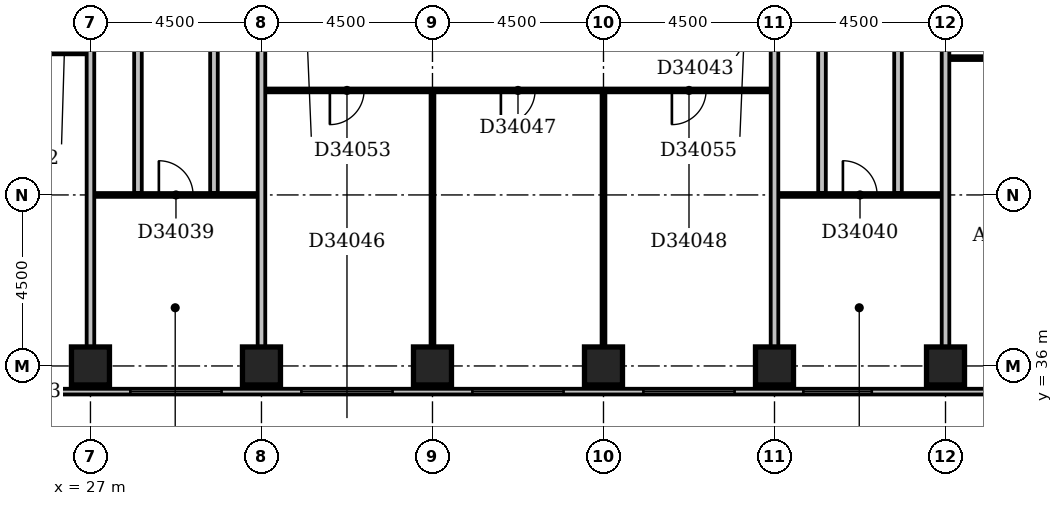
"""IFC4 building model, lengths in metres.
Left out: names, types, materials, properties, quantities, classifications, styles, units other than length and angle.
Written with IfcOpenShell. Run it as: python <this file> out.ifc"""

import sys

from ifc_helpers import new_model, si_unit, direction, frame, frame_2d, origin, origin_2d, place, context, subcontext, project, spatial, rectangle, extrude, element, fill, save


model = new_model("IFC4")
c1 = context("Model", 3, precision=1e-05, world=origin(), true_north=direction((0.0, 1.0)))
c2 = subcontext(c1, "Body", "Model", "MODEL_VIEW")
j1 = project(units=[si_unit("LENGTHUNIT", "METRE"), si_unit("PLANEANGLEUNIT", "RADIAN")], contexts=[c1])
p1 = place(None, origin())
s1 = spatial("IfcSite", under=j1, at=p1, CompositionType="ELEMENT")
p2 = place(p1, origin())
s2 = spatial("IfcBuilding", under=s1, at=p2, CompositionType="ELEMENT")
p3 = place(p2, frame((0.0, 0.0, 137.6)))
s3 = spatial("IfcBuildingStorey", under=s2, at=p3, CompositionType="ELEMENT", Elevation=137.6)
for number, where, z_axis, x_axis in (
    (1, (27.0, 36.0, -0.3), (0.0, 0.0, 1.0), (1.0, 0.0, 0.0)),
    (2, (31.5, 36.0, -0.3), (0.0, 0.0, 1.0), (1.0, 0.0, 0.0)),
    (3, (36.0, 36.0, -0.3), (0.0, 0.0, 1.0), (1.0, 0.0, 0.0)),
    (4, (40.5, 36.0, -0.3), (0.0, 0.0, 1.0), (1.0, 0.0, 0.0)),
    (5, (45.0, 36.0, -0.3), (0.0, 0.0, 1.0), (1.0, 0.0, 0.0)),
    (6, (49.5, 36.0, -0.3), (0.0, 0.0, 1.0), (1.0, 0.0, 0.0)),
):
    element("IfcColumn", number, at=place(p3, frame(where, z_axis=z_axis, x_axis=x_axis)), inside=s3, PredefinedType="COLUMN", context=c2, shape_type="SweptSolid", body=[
        extrude(rectangle(XDim=1.0, YDim=1.0, at=origin_2d()), origin(), (0.0, 0.0, 1.0), 3.6),
    ])
p4 = place(p3, frame((23.1, 35.325, 0.0), z_axis=(0.0, 0.0, 1.0), x_axis=(1.0, 0.0, 0.0)))
e7 = element("IfcWall", 7, at=p4, inside=s3, PredefinedType="STANDARD", context=c2, shape_type="SweptSolid", body=[
    extrude(rectangle(XDim=45.15, YDim=0.15, at=frame_2d((22.575, 0.0))), origin(), (0.0, 0.0, 1.0), 2.7),
])
p5 = place(p4, frame((2.235, 0.0, 0.6)))
e8 = element("IfcOpeningElement", 8, at=p5, cuts=e7, PredefinedType="OPENING", context=c2, shape_type="SweptSolid", body=[
    extrude(rectangle(XDim=0.9, YDim=1.8, at=frame_2d((0.45, 0.9))), frame((0.0, 0.087, 0.0), z_axis=(0.0, -1.0, 0.0), x_axis=(1.0, 0.0, 0.0)), (0.0, 0.0, 1.0), 0.174),
])
p6 = place(p4, frame((4.95, 0.0, 0.6)))
e9 = element("IfcOpeningElement", 9, at=p6, cuts=e7, PredefinedType="OPENING", context=c2, shape_type="SweptSolid", body=[
    extrude(rectangle(XDim=2.4, YDim=1.8, at=frame_2d((1.2, 0.9))), frame((0.0, 0.087, 0.0), z_axis=(0.0, -1.0, 0.0), x_axis=(1.0, 0.0, 0.0)), (0.0, 0.0, 1.0), 0.174),
])
p7 = place(p4, frame((9.45, 0.0, 0.6)))
e10 = element("IfcOpeningElement", 10, at=p7, cuts=e7, PredefinedType="OPENING", context=c2, shape_type="SweptSolid", body=[
    extrude(rectangle(XDim=2.4, YDim=1.8, at=frame_2d((1.2, 0.9))), frame((0.0, 0.087, 0.0), z_axis=(0.0, -1.0, 0.0), x_axis=(1.0, 0.0, 0.0)), (0.0, 0.0, 1.0), 0.174),
])
p8 = place(p4, frame((13.95, 0.0, 0.6)))
e11 = element("IfcOpeningElement", 11, at=p8, cuts=e7, PredefinedType="OPENING", context=c2, shape_type="SweptSolid", body=[
    extrude(rectangle(XDim=2.4, YDim=1.8, at=frame_2d((1.2, 0.9))), frame((0.0, 0.087, 0.0), z_axis=(0.0, -1.0, 0.0), x_axis=(1.0, 0.0, 0.0)), (0.0, 0.0, 1.0), 0.174),
])
p9 = place(p4, frame((18.45, 0.0, 0.6)))
e12 = element("IfcOpeningElement", 12, at=p9, cuts=e7, PredefinedType="OPENING", context=c2, shape_type="SweptSolid", body=[
    extrude(rectangle(XDim=2.4, YDim=1.8, at=frame_2d((1.2, 0.9))), frame((0.0, 0.087, 0.0), z_axis=(0.0, -1.0, 0.0), x_axis=(1.0, 0.0, 0.0)), (0.0, 0.0, 1.0), 0.174),
])
p10 = place(p4, frame((22.66, 0.0, 0.6)))
e13 = element("IfcOpeningElement", 13, at=p10, cuts=e7, PredefinedType="OPENING", context=c2, shape_type="SweptSolid", body=[
    extrude(rectangle(XDim=1.8, YDim=1.8, at=frame_2d((0.9, 0.9))), frame((0.0, 0.087, 0.0), z_axis=(0.0, -1.0, 0.0), x_axis=(1.0, 0.0, 0.0)), (0.0, 0.0, 1.0), 0.174),
])
p11 = place(p4, frame((28.911, 0.0, 0.6)))
e14 = element("IfcOpeningElement", 14, at=p11, cuts=e7, PredefinedType="OPENING", context=c2, shape_type="SweptSolid", body=[
    extrude(rectangle(XDim=1.2, YDim=1.8, at=frame_2d((0.6, 0.9))), frame((0.0, 0.087, 0.0), z_axis=(0.0, -1.0, 0.0), x_axis=(1.0, 0.0, 0.0)), (0.0, 0.0, 1.0), 0.174),
])
p12 = place(p4, frame((31.95, 0.0, 0.6)))
e15 = element("IfcOpeningElement", 15, at=p12, cuts=e7, PredefinedType="OPENING", context=c2, shape_type="SweptSolid", body=[
    extrude(rectangle(XDim=2.4, YDim=1.8, at=frame_2d((1.2, 0.9))), frame((0.0, 0.087, 0.0), z_axis=(0.0, -1.0, 0.0), x_axis=(1.0, 0.0, 0.0)), (0.0, 0.0, 1.0), 0.174),
])
p13 = place(p4, frame((36.45, 0.0, 0.6)))
e16 = element("IfcOpeningElement", 16, at=p13, cuts=e7, PredefinedType="OPENING", context=c2, shape_type="SweptSolid", body=[
    extrude(rectangle(XDim=2.4, YDim=1.8, at=frame_2d((1.2, 0.9))), frame((0.0, 0.087, 0.0), z_axis=(0.0, -1.0, 0.0), x_axis=(1.0, 0.0, 0.0)), (0.0, 0.0, 1.0), 0.174),
])
p14 = place(p4, frame((40.95, 0.0, 0.6)))
e17 = element("IfcOpeningElement", 17, at=p14, cuts=e7, PredefinedType="OPENING", context=c2, shape_type="SweptSolid", body=[
    extrude(rectangle(XDim=2.4, YDim=1.8, at=frame_2d((1.2, 0.9))), frame((0.0, 0.087, 0.0), z_axis=(0.0, -1.0, 0.0), x_axis=(1.0, 0.0, 0.0)), (0.0, 0.0, 1.0), 0.174),
])
p15 = place(p3, frame((27.0, 36.5, 0.0), z_axis=(0.0, 0.0, 1.0), x_axis=(0.0, 1.0, 0.0)))
e18 = element("IfcWall", 18, at=p15, inside=s3, PredefinedType="PARTITIONING", context=c2, shape_type="SweptSolid", body=[
    extrude(rectangle(XDim=12.9, YDim=0.2, at=frame_2d((6.45, 0.0))), origin(), (0.0, 0.0, 1.0), 2.6),
])
p16 = place(p3, frame((31.5, 36.5, 0.0), z_axis=(0.0, 0.0, 1.0), x_axis=(0.0, 1.0, 0.0)))
e19 = element("IfcWall", 19, at=p16, inside=s3, PredefinedType="PARTITIONING", context=c2, shape_type="SweptSolid", body=[
    extrude(rectangle(XDim=12.9, YDim=0.2, at=frame_2d((6.45, 0.0))), origin(), (0.0, 0.0, 1.0), 3.3),
])
p17 = place(p3, frame((36.0, 36.5, 0.0), z_axis=(0.0, 0.0, 1.0), x_axis=(0.0, 1.0, 0.0)))
e20 = element("IfcWall", 20, at=p17, inside=s3, PredefinedType="PARTITIONING", context=c2, shape_type="SweptSolid", body=[
    extrude(rectangle(XDim=6.7, YDim=0.1, at=frame_2d((3.35, 0.0))), origin(), (0.0, 0.0, 1.0), 2.4),
])
p18 = place(p3, frame((40.5, 36.5, 0.0), z_axis=(0.0, 0.0, 1.0), x_axis=(0.0, 1.0, 0.0)))
e21 = element("IfcWall", 21, at=p18, inside=s3, PredefinedType="PARTITIONING", context=c2, shape_type="SweptSolid", body=[
    extrude(rectangle(XDim=6.7, YDim=0.1, at=frame_2d((3.35, 0.0))), origin(), (0.0, 0.0, 1.0), 3.3),
])
p19 = place(p3, frame((45.0, 36.5, 0.0), z_axis=(0.0, 0.0, 1.0), x_axis=(0.0, 1.0, 0.0)))
e22 = element("IfcWall", 22, at=p19, inside=s3, PredefinedType="PARTITIONING", context=c2, shape_type="SweptSolid", body=[
    extrude(rectangle(XDim=12.9, YDim=0.2, at=frame_2d((6.45, 0.0))), origin(), (0.0, 0.0, 1.0), 2.6),
])
p20 = place(p3, frame((49.5, 36.5, 0.0), z_axis=(0.0, 0.0, 1.0), x_axis=(0.0, 1.0, 0.0)))
e23 = element("IfcWall", 23, at=p20, inside=s3, PredefinedType="PARTITIONING", context=c2, shape_type="SweptSolid", body=[
    extrude(rectangle(XDim=12.9, YDim=0.2, at=frame_2d((6.45, 0.0))), origin(), (0.0, 0.0, 1.0), 3.3),
])
p21 = place(p3, frame((27.1, 40.5, 0.0), z_axis=(0.0, 0.0, 1.0), x_axis=(1.0, 0.0, 0.0)))
e24 = element("IfcWall", 24, at=p21, inside=s3, PredefinedType="PARTITIONING", context=c2, shape_type="SweptSolid", body=[
    extrude(rectangle(XDim=4.3, YDim=0.1, at=frame_2d((2.15, 0.0))), origin(), (0.0, 0.0, 1.0), 3.3),
])
p22 = place(p21, frame((1.7, 0.0, 0.0)))
e25 = element("IfcOpeningElement", 25, at=p22, cuts=e24, PredefinedType="OPENING", context=c2, shape_type="SweptSolid", body=[
    extrude(rectangle(XDim=0.9, YDim=2.1, at=frame_2d((0.45, 1.05))), frame((0.0, 0.062, 0.0), z_axis=(0.0, -1.0, 0.0), x_axis=(1.0, 0.0, 0.0)), (0.0, 0.0, 1.0), 0.124),
])
p23 = place(p3, frame((45.1, 40.5, 0.0), z_axis=(0.0, 0.0, 1.0), x_axis=(1.0, 0.0, 0.0)))
e26 = element("IfcWall", 26, at=p23, inside=s3, PredefinedType="PARTITIONING", context=c2, shape_type="SweptSolid", body=[
    extrude(rectangle(XDim=4.3, YDim=0.1, at=frame_2d((2.15, 0.0))), origin(), (0.0, 0.0, 1.0), 3.3),
])
p24 = place(p23, frame((1.7, 0.0, 0.0)))
e27 = element("IfcOpeningElement", 27, at=p24, cuts=e26, PredefinedType="OPENING", context=c2, shape_type="SweptSolid", body=[
    extrude(rectangle(XDim=0.9, YDim=2.1, at=frame_2d((0.45, 1.05))), frame((0.0, 0.062, 0.0), z_axis=(0.0, -1.0, 0.0), x_axis=(1.0, 0.0, 0.0)), (0.0, 0.0, 1.0), 0.124),
])
p25 = place(p3, frame((28.25, 40.55, 0.0), z_axis=(0.0, 0.0, 1.0), x_axis=(0.0, 1.0, 0.0)))
e28 = element("IfcWall", 28, at=p25, inside=s3, PredefinedType="PARTITIONING", context=c2, shape_type="SweptSolid", body=[
    extrude(rectangle(XDim=8.95, YDim=0.2, at=frame_2d((4.475, 0.0))), origin(), (0.0, 0.0, 1.0), 3.3),
])
p26 = place(p25, frame((5.55, 0.0, 0.0)))
e29 = element("IfcOpeningElement", 29, at=p26, cuts=e28, PredefinedType="OPENING", context=c2, shape_type="SweptSolid", body=[
    extrude(rectangle(XDim=0.8, YDim=2.1, at=frame_2d((0.4, 1.05))), frame((0.0, 0.112, 0.0), z_axis=(0.0, -1.0, 0.0), x_axis=(1.0, 0.0, 0.0)), (0.0, 0.0, 1.0), 0.224),
])
p27 = place(p3, frame((30.25, 40.55, 0.0), z_axis=(0.0, 0.0, 1.0), x_axis=(0.0, 1.0, 0.0)))
e30 = element("IfcWall", 30, at=p27, inside=s3, PredefinedType="PARTITIONING", context=c2, shape_type="SweptSolid", body=[
    extrude(rectangle(XDim=8.95, YDim=0.2, at=frame_2d((4.475, 0.0))), origin(), (0.0, 0.0, 1.0), 3.3),
])
p28 = place(p27, frame((5.55, 0.0, 0.0)))
e31 = element("IfcOpeningElement", 31, at=p28, cuts=e30, PredefinedType="OPENING", context=c2, shape_type="SweptSolid", body=[
    extrude(rectangle(XDim=0.8, YDim=2.1, at=frame_2d((0.4, 1.05))), frame((0.0, 0.112, 0.0), z_axis=(0.0, -1.0, 0.0), x_axis=(1.0, 0.0, 0.0)), (0.0, 0.0, 1.0), 0.224),
])
p29 = place(p3, frame((46.25, 40.55, 0.0), z_axis=(0.0, 0.0, 1.0), x_axis=(0.0, 1.0, 0.0)))
e32 = element("IfcWall", 32, at=p29, inside=s3, PredefinedType="PARTITIONING", context=c2, shape_type="SweptSolid", body=[
    extrude(rectangle(XDim=8.95, YDim=0.2, at=frame_2d((4.475, 0.0))), origin(), (0.0, 0.0, 1.0), 3.3),
])
p30 = place(p29, frame((5.55, 0.0, 0.0)))
e33 = element("IfcOpeningElement", 33, at=p30, cuts=e32, PredefinedType="OPENING", context=c2, shape_type="SweptSolid", body=[
    extrude(rectangle(XDim=0.8, YDim=2.1, at=frame_2d((0.4, 1.05))), frame((0.0, 0.112, 0.0), z_axis=(0.0, -1.0, 0.0), x_axis=(1.0, 0.0, 0.0)), (0.0, 0.0, 1.0), 0.224),
])
p31 = place(p3, frame((48.25, 40.55, 0.0), z_axis=(0.0, 0.0, 1.0), x_axis=(0.0, 1.0, 0.0)))
e34 = element("IfcWall", 34, at=p31, inside=s3, PredefinedType="PARTITIONING", context=c2, shape_type="SweptSolid", body=[
    extrude(rectangle(XDim=8.95, YDim=0.2, at=frame_2d((4.475, 0.0))), origin(), (0.0, 0.0, 1.0), 3.3),
])
p32 = place(p31, frame((5.55, 0.0, 0.0)))
e35 = element("IfcOpeningElement", 35, at=p32, cuts=e34, PredefinedType="OPENING", context=c2, shape_type="SweptSolid", body=[
    extrude(rectangle(XDim=0.8, YDim=2.1, at=frame_2d((0.4, 1.05))), frame((0.0, 0.112, 0.0), z_axis=(0.0, -1.0, 0.0), x_axis=(1.0, 0.0, 0.0)), (0.0, 0.0, 1.0), 0.224),
])
p33 = place(p3, frame((31.6, 43.25, 0.0), z_axis=(0.0, 0.0, 1.0), x_axis=(1.0, 0.0, 0.0)))
e36 = element("IfcWall", 36, at=p33, inside=s3, PredefinedType="PARTITIONING", context=c2, shape_type="SweptSolid", body=[
    extrude(rectangle(XDim=13.3, YDim=0.1, at=frame_2d((6.65, 0.0))), origin(), (0.0, 0.0, 1.0), 3.3),
])
p34 = place(p33, frame((1.7, 0.0, 0.0)))
e37 = element("IfcOpeningElement", 37, at=p34, cuts=e36, PredefinedType="OPENING", context=c2, shape_type="SweptSolid", body=[
    extrude(rectangle(XDim=0.9, YDim=2.1, at=frame_2d((0.45, 1.05))), frame((0.0, 0.062, 0.0), z_axis=(0.0, -1.0, 0.0), x_axis=(1.0, 0.0, 0.0)), (0.0, 0.0, 1.0), 0.124),
])
p35 = place(p33, frame((6.2, 0.0, 0.0)))
e38 = element("IfcOpeningElement", 38, at=p35, cuts=e36, PredefinedType="OPENING", context=c2, shape_type="SweptSolid", body=[
    extrude(rectangle(XDim=0.9, YDim=2.1, at=frame_2d((0.45, 1.05))), frame((0.0, 0.062, 0.0), z_axis=(0.0, -1.0, 0.0), x_axis=(1.0, 0.0, 0.0)), (0.0, 0.0, 1.0), 0.124),
])
p36 = place(p33, frame((10.7, 0.0, 0.0)))
e39 = element("IfcOpeningElement", 39, at=p36, cuts=e36, PredefinedType="OPENING", context=c2, shape_type="SweptSolid", body=[
    extrude(rectangle(XDim=0.9, YDim=2.1, at=frame_2d((0.45, 1.05))), frame((0.0, 0.062, 0.0), z_axis=(0.0, -1.0, 0.0), x_axis=(1.0, 0.0, 0.0)), (0.0, 0.0, 1.0), 0.124),
])
p37 = place(p3, frame((49.6, 44.1, 0.0), z_axis=(0.0, 0.0, 1.0), x_axis=(1.0, 0.0, 0.0)))
e40 = element("IfcWall", 40, at=p37, inside=s3, PredefinedType="PARTITIONING", context=c2, shape_type="SweptSolid", body=[
    extrude(rectangle(XDim=18.5, YDim=0.1, at=frame_2d((9.25, 0.0))), origin(), (0.0, 0.0, 1.0), 3.3),
])
p38 = place(p37, frame((3.95, 0.0, 0.0)))
e41 = element("IfcOpeningElement", 41, at=p38, cuts=e40, PredefinedType="OPENING", context=c2, shape_type="SweptSolid", body=[
    extrude(rectangle(XDim=0.9, YDim=2.1, at=frame_2d((0.45, 1.05))), frame((0.0, 0.062, 0.0), z_axis=(0.0, -1.0, 0.0), x_axis=(1.0, 0.0, 0.0)), (0.0, 0.0, 1.0), 0.124),
])
p39 = place(p37, frame((10.7, 0.0, 0.0)))
e42 = element("IfcOpeningElement", 42, at=p39, cuts=e40, PredefinedType="OPENING", context=c2, shape_type="SweptSolid", body=[
    extrude(rectangle(XDim=0.9, YDim=2.1, at=frame_2d((0.45, 1.05))), frame((0.0, 0.062, 0.0), z_axis=(0.0, -1.0, 0.0), x_axis=(1.0, 0.0, 0.0)), (0.0, 0.0, 1.0), 0.124),
])
p40 = place(p37, frame((14.05, 0.0, 0.0)))
e43 = element("IfcOpeningElement", 43, at=p40, cuts=e40, PredefinedType="OPENING", context=c2, shape_type="SweptSolid", body=[
    extrude(rectangle(XDim=0.9, YDim=2.1, at=frame_2d((0.45, 1.05))), frame((0.0, 0.062, 0.0), z_axis=(0.0, -1.0, 0.0), x_axis=(1.0, 0.0, 0.0)), (0.0, 0.0, 1.0), 0.124),
])
p41 = place(p3, frame((22.6, 44.25, 0.0), z_axis=(0.0, 0.0, 1.0), x_axis=(1.0, 0.0, 0.0)))
e44 = element("IfcWall", 44, at=p41, inside=s3, PredefinedType="PARTITIONING", context=c2, shape_type="SweptSolid", body=[
    extrude(rectangle(XDim=4.3, YDim=0.1, at=frame_2d((2.15, 0.0))), origin(), (0.0, 0.0, 1.0), 3.3),
])
p42 = place(p41, frame((1.7, 0.0, 0.0)))
e45 = element("IfcOpeningElement", 45, at=p42, cuts=e44, PredefinedType="OPENING", context=c2, shape_type="SweptSolid", body=[
    extrude(rectangle(XDim=0.9, YDim=2.1, at=frame_2d((0.45, 1.05))), frame((0.0, 0.062, 0.0), z_axis=(0.0, -1.0, 0.0), x_axis=(1.0, 0.0, 0.0)), (0.0, 0.0, 1.0), 0.124),
])
p43 = place(p5, origin())
e46 = element("IfcWindow", 46, at=p43, inside=s3, PartitioningType="SINGLE_PANEL", PredefinedType="WINDOW", context=c2, shape_type="SweptSolid", body=[
    extrude(rectangle(XDim=0.9, YDim=1.8, at=frame_2d((0.45, 0.9))), frame((0.0, 0.03, 0.0), z_axis=(0.0, -1.0, 0.0), x_axis=(1.0, 0.0, 0.0)), (0.0, 0.0, 1.0), 0.06),
])
fill(e8, e46)
p44 = place(p6, origin())
e47 = element("IfcWindow", 47, at=p44, inside=s3, PartitioningType="SINGLE_PANEL", PredefinedType="WINDOW", context=c2, shape_type="SweptSolid", body=[
    extrude(rectangle(XDim=2.4, YDim=1.8, at=frame_2d((1.2, 0.9))), frame((0.0, 0.03, 0.0), z_axis=(0.0, -1.0, 0.0), x_axis=(1.0, 0.0, 0.0)), (0.0, 0.0, 1.0), 0.06),
])
fill(e9, e47)
p45 = place(p7, origin())
e48 = element("IfcWindow", 48, at=p45, inside=s3, PartitioningType="SINGLE_PANEL", PredefinedType="WINDOW", context=c2, shape_type="SweptSolid", body=[
    extrude(rectangle(XDim=2.4, YDim=1.8, at=frame_2d((1.2, 0.9))), frame((0.0, 0.03, 0.0), z_axis=(0.0, -1.0, 0.0), x_axis=(1.0, 0.0, 0.0)), (0.0, 0.0, 1.0), 0.06),
])
fill(e10, e48)
p46 = place(p8, origin())
e49 = element("IfcWindow", 49, at=p46, inside=s3, PartitioningType="SINGLE_PANEL", PredefinedType="WINDOW", context=c2, shape_type="SweptSolid", body=[
    extrude(rectangle(XDim=2.4, YDim=1.8, at=frame_2d((1.2, 0.9))), frame((0.0, 0.03, 0.0), z_axis=(0.0, -1.0, 0.0), x_axis=(1.0, 0.0, 0.0)), (0.0, 0.0, 1.0), 0.06),
])
fill(e11, e49)
p47 = place(p9, origin())
e50 = element("IfcWindow", 50, at=p47, inside=s3, PartitioningType="SINGLE_PANEL", PredefinedType="WINDOW", context=c2, shape_type="SweptSolid", body=[
    extrude(rectangle(XDim=2.4, YDim=1.8, at=frame_2d((1.2, 0.9))), frame((0.0, 0.03, 0.0), z_axis=(0.0, -1.0, 0.0), x_axis=(1.0, 0.0, 0.0)), (0.0, 0.0, 1.0), 0.06),
])
fill(e12, e50)
p48 = place(p10, origin())
e51 = element("IfcWindow", 51, at=p48, inside=s3, PartitioningType="SINGLE_PANEL", PredefinedType="WINDOW", context=c2, shape_type="SweptSolid", body=[
    extrude(rectangle(XDim=1.8, YDim=1.8, at=frame_2d((0.9, 0.9))), frame((0.0, 0.03, 0.0), z_axis=(0.0, -1.0, 0.0), x_axis=(1.0, 0.0, 0.0)), (0.0, 0.0, 1.0), 0.06),
])
fill(e13, e51)
p49 = place(p22, origin())
e52 = element("IfcDoor", 52, at=p49, inside=s3, OperationType="SINGLE_SWING_LEFT", PredefinedType="DOOR", context=c2, shape_type="SweptSolid", body=[
    extrude(rectangle(XDim=0.9, YDim=2.1, at=frame_2d((0.45, 1.05))), frame((0.0, 0.025, 0.0), z_axis=(0.0, -1.0, 0.0), x_axis=(1.0, 0.0, 0.0)), (0.0, 0.0, 1.0), 0.05),
])
fill(e25, e52)
p50 = place(p24, origin())
e53 = element("IfcDoor", 53, at=p50, inside=s3, OperationType="SINGLE_SWING_LEFT", PredefinedType="DOOR", context=c2, shape_type="SweptSolid", body=[
    extrude(rectangle(XDim=0.9, YDim=2.1, at=frame_2d((0.45, 1.05))), frame((0.0, 0.025, 0.0), z_axis=(0.0, -1.0, 0.0), x_axis=(1.0, 0.0, 0.0)), (0.0, 0.0, 1.0), 0.05),
])
fill(e27, e53)
p51 = place(p34, frame((0.9, 0.0, 0.0), z_axis=(0.0, 0.0, 1.0), x_axis=(-1.0, 0.0, 0.0)))
e54 = element("IfcDoor", 54, at=p51, inside=s3, OperationType="SINGLE_SWING_RIGHT", PredefinedType="DOOR", context=c2, shape_type="SweptSolid", body=[
    extrude(rectangle(XDim=0.9, YDim=2.1, at=frame_2d((0.45, 1.05))), frame((0.0, 0.025, 0.0), z_axis=(0.0, -1.0, 0.0), x_axis=(1.0, 0.0, 0.0)), (0.0, 0.0, 1.0), 0.05),
])
fill(e37, e54)
p52 = place(p35, frame((0.9, 0.0, 0.0), z_axis=(0.0, 0.0, 1.0), x_axis=(-1.0, 0.0, 0.0)))
e55 = element("IfcDoor", 55, at=p52, inside=s3, OperationType="SINGLE_SWING_RIGHT", PredefinedType="DOOR", context=c2, shape_type="SweptSolid", body=[
    extrude(rectangle(XDim=0.9, YDim=2.1, at=frame_2d((0.45, 1.05))), frame((0.0, 0.025, 0.0), z_axis=(0.0, -1.0, 0.0), x_axis=(1.0, 0.0, 0.0)), (0.0, 0.0, 1.0), 0.05),
])
fill(e38, e55)
p53 = place(p36, frame((0.9, 0.0, 0.0), z_axis=(0.0, 0.0, 1.0), x_axis=(-1.0, 0.0, 0.0)))
e56 = element("IfcDoor", 56, at=p53, inside=s3, OperationType="SINGLE_SWING_RIGHT", PredefinedType="DOOR", context=c2, shape_type="SweptSolid", body=[
    extrude(rectangle(XDim=0.9, YDim=2.1, at=frame_2d((0.45, 1.05))), frame((0.0, 0.025, 0.0), z_axis=(0.0, -1.0, 0.0), x_axis=(1.0, 0.0, 0.0)), (0.0, 0.0, 1.0), 0.05),
])
fill(e39, e56)
save(model, sys.argv[1])
